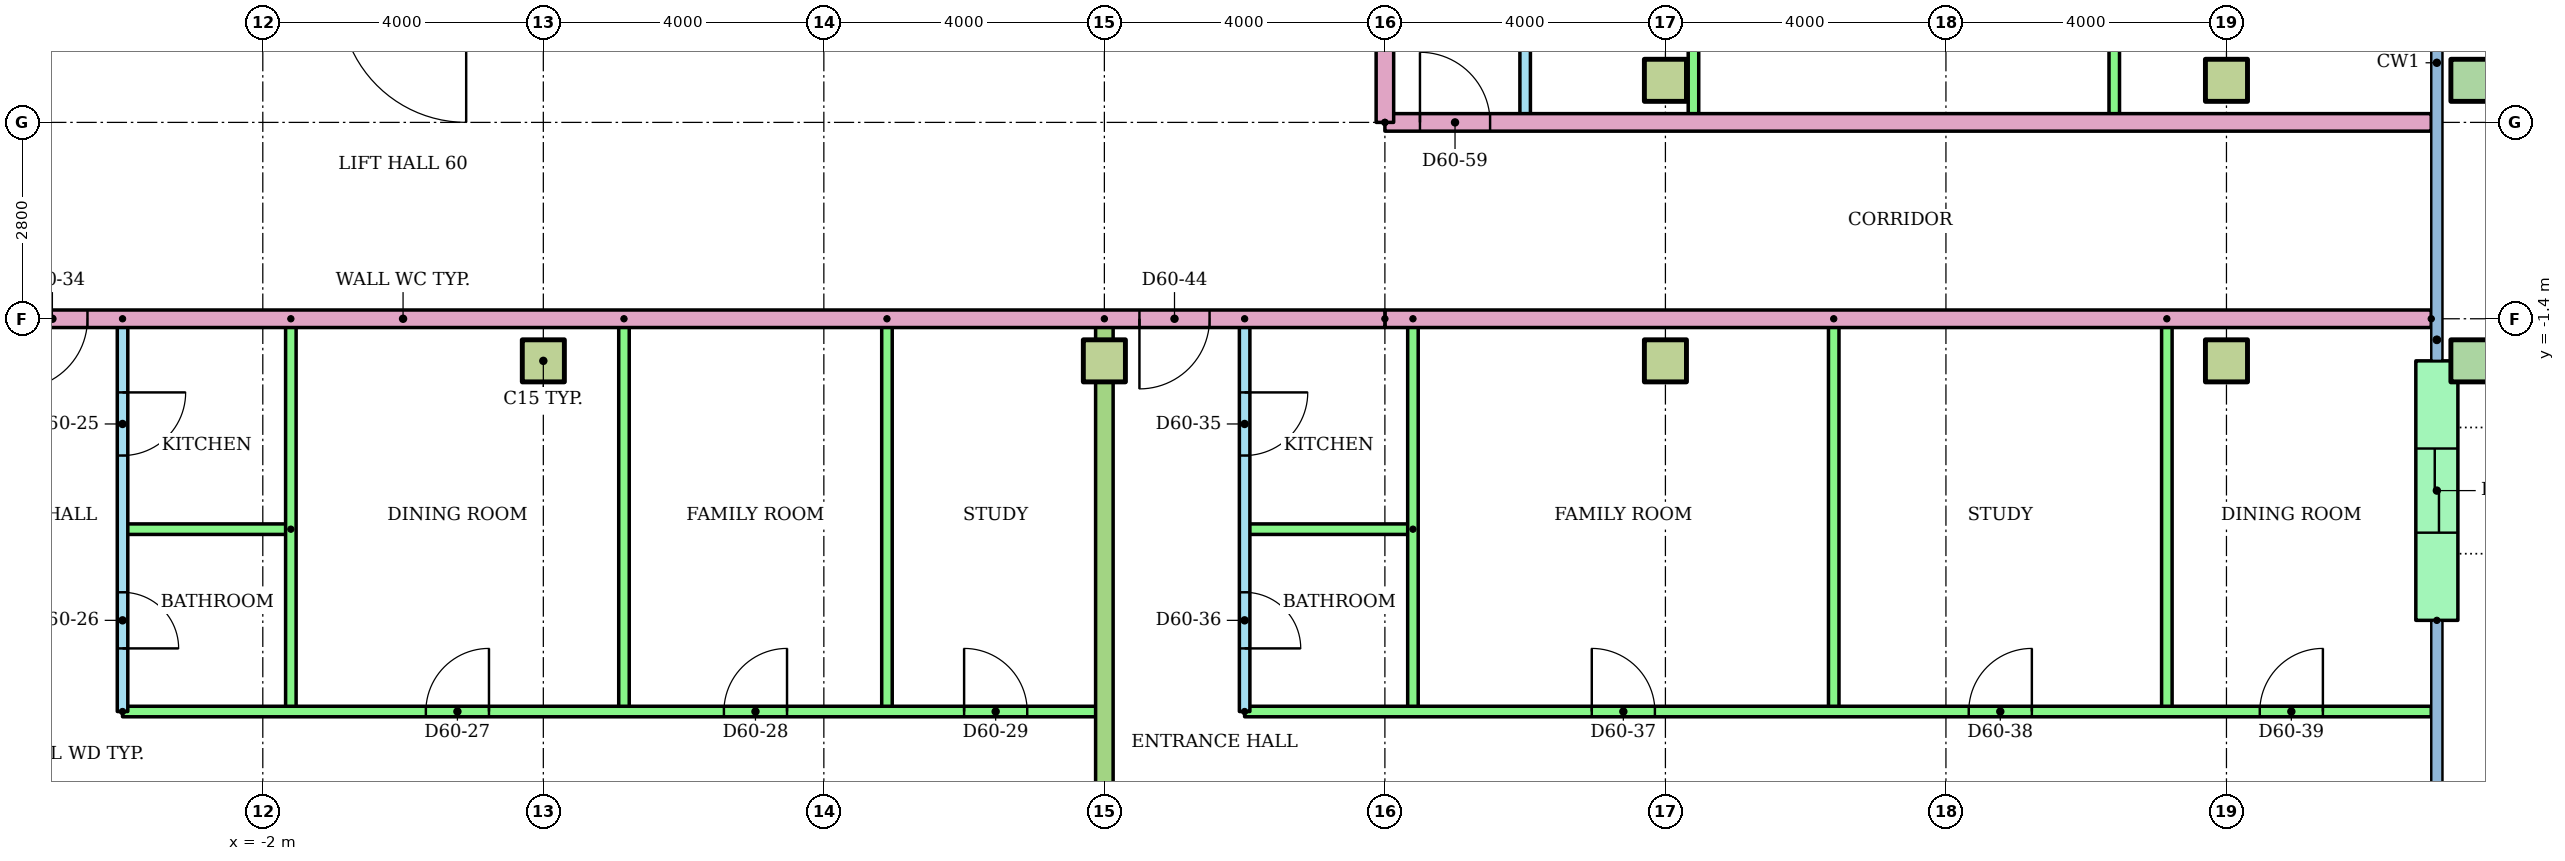
"""IFC4 building model, lengths in metres.
Left out: names, types, materials, properties, quantities, classifications, styles, units other than length and angle.
Written with IfcOpenShell. Run it as: python <this file> out.ifc"""

import sys

from ifc_helpers import new_model, si_unit, direction, frame, frame_2d, origin, origin_2d, place, context, subcontext, project, spatial, rectangle, hollow_rectangle, extrude, element, fill, save


model = new_model("IFC4")
c1 = context("Model", 3, precision=1e-05, world=origin(), true_north=direction((0.0, 1.0)))
c2 = subcontext(c1, "Body", "Model", "MODEL_VIEW")
j1 = project(units=[si_unit("LENGTHUNIT", "METRE"), si_unit("PLANEANGLEUNIT", "RADIAN")], contexts=[c1])
p1 = place(None, origin())
s1 = spatial("IfcSite", under=j1, at=p1, CompositionType="ELEMENT")
p2 = place(p1, origin())
s2 = spatial("IfcBuilding", under=s1, at=p2, CompositionType="ELEMENT")
p3 = place(p2, frame((0.0, 0.0, 230.0)))
s3 = spatial("IfcBuildingStorey", under=s2, at=p3, CompositionType="ELEMENT", Elevation=230.0)
for number, where in (
    (1, (2.0, -2.0, 0.0)),
    (2, (10.0, -2.0, 0.0)),
    (3, (18.0, -2.0, 0.0)),
    (4, (26.0, -2.0, 0.0)),
):
    element("IfcColumn", number, at=place(p3, frame(where)), inside=s3, PredefinedType="COLUMN", context=c2, shape_type="SweptSolid", body=[
        extrude(rectangle(XDim=0.6, YDim=0.6, at=origin_2d()), origin(), (0.0, 0.0, 1.0), 3.2),
    ])
p4 = place(p3, frame((29.5, -2.0, 0.0)))
e5 = element("IfcColumn", 5, at=p4, inside=s3, PredefinedType="COLUMN", context=c2, shape_type="SweptSolid", body=[
    extrude(hollow_rectangle(XDim=0.6, YDim=0.6, WallThickness=0.03, at=origin_2d()), origin(), (0.0, 0.0, 1.0), 3.2),
])
for number, where in (
    (6, (18.0, 2.0, 0.0)),
    (7, (26.0, 2.0, 0.0)),
):
    element("IfcColumn", number, at=place(p3, frame(where)), inside=s3, PredefinedType="COLUMN", context=c2, shape_type="SweptSolid", body=[
        extrude(rectangle(XDim=0.6, YDim=0.6, at=origin_2d()), origin(), (0.0, 0.0, 1.0), 3.2),
    ])
p5 = place(p3, frame((29.5, 2.0, 0.0)))
e8 = element("IfcColumn", 8, at=p5, inside=s3, PredefinedType="COLUMN", context=c2, shape_type="SweptSolid", body=[
    extrude(hollow_rectangle(XDim=0.6, YDim=0.6, WallThickness=0.03, at=origin_2d()), origin(), (0.0, 0.0, 1.0), 3.2),
])
p6 = place(p3, frame((29.0, -5.7, 0.0), z_axis=(0.0, 0.0, 1.0), x_axis=(0.0, 1.0, 0.0)))
e9 = element("IfcWall", 9, at=p6, inside=s3, PredefinedType="STANDARD", context=c2, shape_type="SweptSolid", body=[
    extrude(rectangle(XDim=3.7, YDim=0.6, at=frame_2d((1.85, 0.0))), origin(), (0.0, 0.0, 1.0), 2.92),
])
p7 = place(p6, frame((1.25, 0.0, 0.0)))
e10 = element("IfcOpeningElement", 10, at=p7, cuts=e9, PredefinedType="OPENING", context=c2, shape_type="SweptSolid", body=[
    extrude(rectangle(XDim=1.2, YDim=2.1, at=frame_2d((0.6, 1.05))), frame((0.0, 0.31, 0.0), z_axis=(0.0, -1.0, 0.0), x_axis=(1.0, 0.0, 0.0)), (0.0, 0.0, 1.0), 0.62),
])
p8 = place(p3, frame((-4.0, -1.4, 0.0), z_axis=(0.0, 0.0, 1.0), x_axis=(0.0, -1.0, 0.0)))
e11 = element("IfcWall", 11, at=p8, inside=s3, PredefinedType="PARTITIONING", context=c2, shape_type="SweptSolid", body=[
    extrude(rectangle(XDim=5.6, YDim=0.15, at=frame_2d((2.8, 0.0))), origin(), (0.0, 0.0, 1.0), 2.4),
])
p9 = place(p8, frame((1.05, 0.0, 0.0)))
e12 = element("IfcOpeningElement", 12, at=p9, cuts=e11, PredefinedType="OPENING", context=c2, shape_type="SweptSolid", body=[
    extrude(rectangle(XDim=0.9, YDim=2.1, at=frame_2d((0.45, 1.05))), frame((0.0, 0.085, 0.0), z_axis=(0.0, -1.0, 0.0), x_axis=(1.0, 0.0, 0.0)), (0.0, 0.0, 1.0), 0.17),
])
p10 = place(p8, frame((3.9, 0.0, 0.0)))
e13 = element("IfcOpeningElement", 13, at=p10, cuts=e11, PredefinedType="OPENING", context=c2, shape_type="SweptSolid", body=[
    extrude(rectangle(XDim=0.8, YDim=2.1, at=frame_2d((0.4, 1.05))), frame((0.0, 0.085, 0.0), z_axis=(0.0, -1.0, 0.0), x_axis=(1.0, 0.0, 0.0)), (0.0, 0.0, 1.0), 0.17),
])
p11 = place(p3, frame((-1.6, -4.4, 0.0), z_axis=(0.0, 0.0, 1.0), x_axis=(-1.0, 0.0, 0.0)))
e14 = element("IfcWall", 14, at=p11, inside=s3, PredefinedType="PARTITIONING", context=c2, shape_type="SweptSolid", body=[
    extrude(rectangle(XDim=2.4, YDim=0.15, at=frame_2d((1.2, 0.0))), origin(), (0.0, 0.0, 1.0), 2.4),
])
for number, where, z_axis, x_axis in (
    (15, (-1.6, -1.4, 0.0), (0.0, 0.0, 1.0), (0.0, -1.0, 0.0)),
    (16, (3.15, -1.4, 0.0), (0.0, 0.0, 1.0), (0.0, -1.0, 0.0)),
    (17, (6.9, -1.4, 0.0), (0.0, 0.0, 1.0), (0.0, -1.0, 0.0)),
):
    element("IfcWall", number, at=place(p3, frame(where, z_axis=z_axis, x_axis=x_axis)), inside=s3, PredefinedType="PARTITIONING", context=c2, shape_type="SweptSolid", body=[
        extrude(rectangle(XDim=5.6, YDim=0.15, at=frame_2d((2.8, 0.0))), origin(), (0.0, 0.0, 1.0), 2.4),
    ])
p12 = place(p3, frame((-4.0, -7.0, 0.0)))
e18 = element("IfcWall", 18, at=p12, inside=s3, PredefinedType="PARTITIONING", context=c2, shape_type="SweptSolid", body=[
    extrude(rectangle(XDim=14.0, YDim=0.15, at=frame_2d((7.0, 0.0))), origin(), (0.0, 0.0, 1.0), 2.4),
])
p13 = place(p12, frame((4.325, 0.0, 0.0)))
e19 = element("IfcOpeningElement", 19, at=p13, cuts=e18, PredefinedType="OPENING", context=c2, shape_type="SweptSolid", body=[
    extrude(rectangle(XDim=0.9, YDim=2.1, at=frame_2d((0.45, 1.05))), frame((0.0, 0.085, 0.0), z_axis=(0.0, -1.0, 0.0), x_axis=(1.0, 0.0, 0.0)), (0.0, 0.0, 1.0), 0.17),
])
p14 = place(p12, frame((8.575, 0.0, 0.0)))
e20 = element("IfcOpeningElement", 20, at=p14, cuts=e18, PredefinedType="OPENING", context=c2, shape_type="SweptSolid", body=[
    extrude(rectangle(XDim=0.9, YDim=2.1, at=frame_2d((0.45, 1.05))), frame((0.0, 0.085, 0.0), z_axis=(0.0, -1.0, 0.0), x_axis=(1.0, 0.0, 0.0)), (0.0, 0.0, 1.0), 0.17),
])
p15 = place(p12, frame((12.0, 0.0, 0.0)))
e21 = element("IfcOpeningElement", 21, at=p15, cuts=e18, PredefinedType="OPENING", context=c2, shape_type="SweptSolid", body=[
    extrude(rectangle(XDim=0.9, YDim=2.1, at=frame_2d((0.45, 1.05))), frame((0.0, 0.085, 0.0), z_axis=(0.0, -1.0, 0.0), x_axis=(1.0, 0.0, 0.0)), (0.0, 0.0, 1.0), 0.17),
])
p16 = place(p3, frame((12.0, -1.4, 0.0), z_axis=(0.0, 0.0, 1.0), x_axis=(0.0, -1.0, 0.0)))
e22 = element("IfcWall", 22, at=p16, inside=s3, PredefinedType="PARTITIONING", context=c2, shape_type="SweptSolid", body=[
    extrude(rectangle(XDim=5.6, YDim=0.15, at=frame_2d((2.8, 0.0))), origin(), (0.0, 0.0, 1.0), 2.4),
])
p17 = place(p16, frame((1.05, 0.0, 0.0)))
e23 = element("IfcOpeningElement", 23, at=p17, cuts=e22, PredefinedType="OPENING", context=c2, shape_type="SweptSolid", body=[
    extrude(rectangle(XDim=0.9, YDim=2.1, at=frame_2d((0.45, 1.05))), frame((0.0, 0.085, 0.0), z_axis=(0.0, -1.0, 0.0), x_axis=(1.0, 0.0, 0.0)), (0.0, 0.0, 1.0), 0.17),
])
p18 = place(p16, frame((3.9, 0.0, 0.0)))
e24 = element("IfcOpeningElement", 24, at=p18, cuts=e22, PredefinedType="OPENING", context=c2, shape_type="SweptSolid", body=[
    extrude(rectangle(XDim=0.8, YDim=2.1, at=frame_2d((0.4, 1.05))), frame((0.0, 0.085, 0.0), z_axis=(0.0, -1.0, 0.0), x_axis=(1.0, 0.0, 0.0)), (0.0, 0.0, 1.0), 0.17),
])
p19 = place(p3, frame((14.4, -4.4, 0.0), z_axis=(0.0, 0.0, 1.0), x_axis=(-1.0, 0.0, 0.0)))
e25 = element("IfcWall", 25, at=p19, inside=s3, PredefinedType="PARTITIONING", context=c2, shape_type="SweptSolid", body=[
    extrude(rectangle(XDim=2.4, YDim=0.15, at=frame_2d((1.2, 0.0))), origin(), (0.0, 0.0, 1.0), 2.4),
])
for number, where, z_axis, x_axis in (
    (26, (14.4, -1.4, 0.0), (0.0, 0.0, 1.0), (0.0, -1.0, 0.0)),
    (27, (20.4, -1.4, 0.0), (0.0, 0.0, 1.0), (0.0, -1.0, 0.0)),
    (28, (25.15, -1.4, 0.0), (0.0, 0.0, 1.0), (0.0, -1.0, 0.0)),
):
    element("IfcWall", number, at=place(p3, frame(where, z_axis=z_axis, x_axis=x_axis)), inside=s3, PredefinedType="PARTITIONING", context=c2, shape_type="SweptSolid", body=[
        extrude(rectangle(XDim=5.6, YDim=0.15, at=frame_2d((2.8, 0.0))), origin(), (0.0, 0.0, 1.0), 2.4),
    ])
p20 = place(p3, frame((12.0, -7.0, 0.0)))
e29 = element("IfcWall", 29, at=p20, inside=s3, PredefinedType="PARTITIONING", context=c2, shape_type="SweptSolid", body=[
    extrude(rectangle(XDim=16.92, YDim=0.15, at=frame_2d((8.46, 0.0))), origin(), (0.0, 0.0, 1.0), 2.4),
])
p21 = place(p20, frame((4.95, 0.0, 0.0)))
e30 = element("IfcOpeningElement", 30, at=p21, cuts=e29, PredefinedType="OPENING", context=c2, shape_type="SweptSolid", body=[
    extrude(rectangle(XDim=0.9, YDim=2.1, at=frame_2d((0.45, 1.05))), frame((0.0, 0.085, 0.0), z_axis=(0.0, -1.0, 0.0), x_axis=(1.0, 0.0, 0.0)), (0.0, 0.0, 1.0), 0.17),
])
p22 = place(p20, frame((10.325, 0.0, 0.0)))
e31 = element("IfcOpeningElement", 31, at=p22, cuts=e29, PredefinedType="OPENING", context=c2, shape_type="SweptSolid", body=[
    extrude(rectangle(XDim=0.9, YDim=2.1, at=frame_2d((0.45, 1.05))), frame((0.0, 0.085, 0.0), z_axis=(0.0, -1.0, 0.0), x_axis=(1.0, 0.0, 0.0)), (0.0, 0.0, 1.0), 0.17),
])
p23 = place(p20, frame((14.475, 0.0, 0.0)))
e32 = element("IfcOpeningElement", 32, at=p23, cuts=e29, PredefinedType="OPENING", context=c2, shape_type="SweptSolid", body=[
    extrude(rectangle(XDim=0.9, YDim=2.1, at=frame_2d((0.45, 1.05))), frame((0.0, 0.085, 0.0), z_axis=(0.0, -1.0, 0.0), x_axis=(1.0, 0.0, 0.0)), (0.0, 0.0, 1.0), 0.17),
])
p24 = place(p3, frame((10.0, -1.4, 0.0), z_axis=(0.0, 0.0, 1.0), x_axis=(0.0, -1.0, 0.0)))
e33 = element("IfcWall", 33, at=p24, inside=s3, PredefinedType="PARTITIONING", context=c2, shape_type="SweptSolid", body=[
    extrude(rectangle(XDim=15.11, YDim=0.25, at=frame_2d((7.555, 0.0))), origin(), (0.0, 0.0, 1.0), 2.4),
])
p25 = place(p3, frame((28.92, -1.4, 0.0), z_axis=(0.0, 0.0, 1.0), x_axis=(-1.0, 0.0, 0.0)))
e34 = element("IfcWall", 34, at=p25, inside=s3, PredefinedType="PARTITIONING", context=c2, shape_type="SweptSolid", body=[
    extrude(rectangle(XDim=14.92, YDim=0.25, at=frame_2d((7.46, 0.0))), origin(), (0.0, 0.0, 1.0), 2.4),
])
p26 = place(p3, frame((16.0, 9.4, 0.0), z_axis=(0.0, 0.0, 1.0), x_axis=(0.0, -1.0, 0.0)))
e35 = element("IfcWall", 35, at=p26, inside=s3, PredefinedType="PARTITIONING", context=c2, shape_type="SweptSolid", body=[
    extrude(rectangle(XDim=8.0, YDim=0.15, at=frame_2d((4.0, 0.0))), origin(), (0.0, 0.0, 1.0), 2.4),
])
p27 = place(p26, frame((5.3, 0.0, 0.0)))
e36 = element("IfcOpeningElement", 36, at=p27, cuts=e35, PredefinedType="OPENING", context=c2, shape_type="SweptSolid", body=[
    extrude(rectangle(XDim=0.9, YDim=2.1, at=frame_2d((0.45, 1.05))), frame((0.0, 0.085, 0.0), z_axis=(0.0, -1.0, 0.0), x_axis=(1.0, 0.0, 0.0)), (0.0, 0.0, 1.0), 0.17),
])
p28 = place(p26, frame((1.35, 0.0, 0.0)))
e37 = element("IfcOpeningElement", 37, at=p28, cuts=e35, PredefinedType="OPENING", context=c2, shape_type="SweptSolid", body=[
    extrude(rectangle(XDim=0.8, YDim=2.1, at=frame_2d((0.4, 1.05))), frame((0.0, 0.085, 0.0), z_axis=(0.0, -1.0, 0.0), x_axis=(1.0, 0.0, 0.0)), (0.0, 0.0, 1.0), 0.17),
])
for number, where, z_axis, x_axis in (
    (38, (18.4, 9.4, 0.0), (0.0, 0.0, 1.0), (0.0, -1.0, 0.0)),
    (39, (24.4, 9.4, 0.0), (0.0, 0.0, 1.0), (0.0, -1.0, 0.0)),
):
    element("IfcWall", number, at=place(p3, frame(where, z_axis=z_axis, x_axis=x_axis)), inside=s3, PredefinedType="PARTITIONING", context=c2, shape_type="SweptSolid", body=[
        extrude(rectangle(XDim=8.0, YDim=0.15, at=frame_2d((4.0, 0.0))), origin(), (0.0, 0.0, 1.0), 2.4),
    ])
p29 = place(p3, frame((14.0, 1.4, 0.0)))
e40 = element("IfcWall", 40, at=p29, inside=s3, PredefinedType="PARTITIONING", context=c2, shape_type="SweptSolid", body=[
    extrude(rectangle(XDim=14.92, YDim=0.25, at=frame_2d((7.46, 0.0))), origin(), (0.0, 0.0, 1.0), 2.4),
])
p30 = place(p29, frame((0.5, 0.0, 0.0)))
e41 = element("IfcOpeningElement", 41, at=p30, cuts=e40, PredefinedType="OPENING", context=c2, shape_type="SweptSolid", body=[
    extrude(rectangle(XDim=1.0, YDim=2.1, at=frame_2d((0.5, 1.05))), frame((0.0, 0.135, 0.0), z_axis=(0.0, -1.0, 0.0), x_axis=(1.0, 0.0, 0.0)), (0.0, 0.0, 1.0), 0.27),
])
p31 = place(p3, frame((14.0, -1.4, 0.0), z_axis=(0.0, 0.0, 1.0), x_axis=(-1.0, 0.0, 0.0)))
e42 = element("IfcWall", 42, at=p31, inside=s3, PredefinedType="PARTITIONING", context=c2, shape_type="SweptSolid", body=[
    extrude(rectangle(XDim=28.0, YDim=0.25, at=frame_2d((14.0, 0.0))), origin(), (0.0, 0.0, 1.0), 2.4),
])
p32 = place(p31, frame((20.5, 0.0, 0.0)))
e43 = element("IfcOpeningElement", 43, at=p32, cuts=e42, PredefinedType="OPENING", context=c2, shape_type="SweptSolid", body=[
    extrude(rectangle(XDim=1.0, YDim=2.1, at=frame_2d((0.5, 1.05))), frame((0.0, 0.135, 0.0), z_axis=(0.0, -1.0, 0.0), x_axis=(1.0, 0.0, 0.0)), (0.0, 0.0, 1.0), 0.27),
])
p33 = place(p31, frame((18.5, 0.0, 0.0)))
e44 = element("IfcOpeningElement", 44, at=p33, cuts=e42, PredefinedType="OPENING", context=c2, shape_type="SweptSolid", body=[
    extrude(rectangle(XDim=1.0, YDim=2.1, at=frame_2d((0.5, 1.05))), frame((0.0, 0.135, 0.0), z_axis=(0.0, -1.0, 0.0), x_axis=(1.0, 0.0, 0.0)), (0.0, 0.0, 1.0), 0.27),
])
p34 = place(p31, frame((2.5, 0.0, 0.0)))
e45 = element("IfcOpeningElement", 45, at=p34, cuts=e42, PredefinedType="OPENING", context=c2, shape_type="SweptSolid", body=[
    extrude(rectangle(XDim=1.0, YDim=2.1, at=frame_2d((0.5, 1.05))), frame((0.0, 0.135, 0.0), z_axis=(0.0, -1.0, 0.0), x_axis=(1.0, 0.0, 0.0)), (0.0, 0.0, 1.0), 0.27),
])
p35 = place(p3, frame((14.0, 1.4, 0.0), z_axis=(0.0, 0.0, 1.0), x_axis=(0.0, 1.0, 0.0)))
e46 = element("IfcWall", 46, at=p35, inside=s3, PredefinedType="PARTITIONING", context=c2, shape_type="SweptSolid", body=[
    extrude(rectangle(XDim=1.6, YDim=0.25, at=frame_2d((0.8, 0.0))), origin(), (0.0, 0.0, 1.0), 2.4),
])
p36 = place(p9, origin())
e47 = element("IfcDoor", 47, at=p36, inside=s3, OperationType="SINGLE_SWING_LEFT", PredefinedType="DOOR", context=c2, shape_type="SweptSolid", body=[
    extrude(rectangle(XDim=0.9, YDim=2.1, at=frame_2d((0.45, 1.05))), frame((0.0, 0.025, 0.0), z_axis=(0.0, -1.0, 0.0), x_axis=(1.0, 0.0, 0.0)), (0.0, 0.0, 1.0), 0.05),
])
fill(e12, e47)
p37 = place(p10, origin())
e48 = element("IfcDoor", 48, at=p37, inside=s3, OperationType="SINGLE_SWING_RIGHT", PredefinedType="DOOR", context=c2, shape_type="SweptSolid", body=[
    extrude(rectangle(XDim=0.8, YDim=2.1, at=frame_2d((0.4, 1.05))), frame((0.0, 0.025, 0.0), z_axis=(0.0, -1.0, 0.0), x_axis=(1.0, 0.0, 0.0)), (0.0, 0.0, 1.0), 0.05),
])
fill(e13, e48)
p38 = place(p13, origin())
e49 = element("IfcDoor", 49, at=p38, inside=s3, OperationType="SINGLE_SWING_RIGHT", PredefinedType="DOOR", context=c2, shape_type="SweptSolid", body=[
    extrude(rectangle(XDim=0.9, YDim=2.1, at=frame_2d((0.45, 1.05))), frame((0.0, 0.025, 0.0), z_axis=(0.0, -1.0, 0.0), x_axis=(1.0, 0.0, 0.0)), (0.0, 0.0, 1.0), 0.05),
])
fill(e19, e49)
p39 = place(p14, origin())
e50 = element("IfcDoor", 50, at=p39, inside=s3, OperationType="SINGLE_SWING_RIGHT", PredefinedType="DOOR", context=c2, shape_type="SweptSolid", body=[
    extrude(rectangle(XDim=0.9, YDim=2.1, at=frame_2d((0.45, 1.05))), frame((0.0, 0.025, 0.0), z_axis=(0.0, -1.0, 0.0), x_axis=(1.0, 0.0, 0.0)), (0.0, 0.0, 1.0), 0.05),
])
fill(e20, e50)
p40 = place(p15, origin())
e51 = element("IfcDoor", 51, at=p40, inside=s3, OperationType="SINGLE_SWING_LEFT", PredefinedType="DOOR", context=c2, shape_type="SweptSolid", body=[
    extrude(rectangle(XDim=0.9, YDim=2.1, at=frame_2d((0.45, 1.05))), frame((0.0, 0.025, 0.0), z_axis=(0.0, -1.0, 0.0), x_axis=(1.0, 0.0, 0.0)), (0.0, 0.0, 1.0), 0.05),
])
fill(e21, e51)
p41 = place(p33, origin())
e52 = element("IfcDoor", 52, at=p41, inside=s3, OperationType="SINGLE_SWING_RIGHT", PredefinedType="DOOR", context=c2, shape_type="SweptSolid", body=[
    extrude(rectangle(XDim=1.0, YDim=2.1, at=frame_2d((0.5, 1.05))), frame((0.0, 0.025, 0.0), z_axis=(0.0, -1.0, 0.0), x_axis=(1.0, 0.0, 0.0)), (0.0, 0.0, 1.0), 0.05),
])
fill(e44, e52)
p42 = place(p17, origin())
e53 = element("IfcDoor", 53, at=p42, inside=s3, OperationType="SINGLE_SWING_LEFT", PredefinedType="DOOR", context=c2, shape_type="SweptSolid", body=[
    extrude(rectangle(XDim=0.9, YDim=2.1, at=frame_2d((0.45, 1.05))), frame((0.0, 0.025, 0.0), z_axis=(0.0, -1.0, 0.0), x_axis=(1.0, 0.0, 0.0)), (0.0, 0.0, 1.0), 0.05),
])
fill(e23, e53)
p43 = place(p18, origin())
e54 = element("IfcDoor", 54, at=p43, inside=s3, OperationType="SINGLE_SWING_RIGHT", PredefinedType="DOOR", context=c2, shape_type="SweptSolid", body=[
    extrude(rectangle(XDim=0.8, YDim=2.1, at=frame_2d((0.4, 1.05))), frame((0.0, 0.025, 0.0), z_axis=(0.0, -1.0, 0.0), x_axis=(1.0, 0.0, 0.0)), (0.0, 0.0, 1.0), 0.05),
])
fill(e24, e54)
p44 = place(p21, origin())
e55 = element("IfcDoor", 55, at=p44, inside=s3, OperationType="SINGLE_SWING_LEFT", PredefinedType="DOOR", context=c2, shape_type="SweptSolid", body=[
    extrude(rectangle(XDim=0.9, YDim=2.1, at=frame_2d((0.45, 1.05))), frame((0.0, 0.025, 0.0), z_axis=(0.0, -1.0, 0.0), x_axis=(1.0, 0.0, 0.0)), (0.0, 0.0, 1.0), 0.05),
])
fill(e30, e55)
p45 = place(p22, origin())
e56 = element("IfcDoor", 56, at=p45, inside=s3, OperationType="SINGLE_SWING_RIGHT", PredefinedType="DOOR", context=c2, shape_type="SweptSolid", body=[
    extrude(rectangle(XDim=0.9, YDim=2.1, at=frame_2d((0.45, 1.05))), frame((0.0, 0.025, 0.0), z_axis=(0.0, -1.0, 0.0), x_axis=(1.0, 0.0, 0.0)), (0.0, 0.0, 1.0), 0.05),
])
fill(e31, e56)
p46 = place(p23, origin())
e57 = element("IfcDoor", 57, at=p46, inside=s3, OperationType="SINGLE_SWING_RIGHT", PredefinedType="DOOR", context=c2, shape_type="SweptSolid", body=[
    extrude(rectangle(XDim=0.9, YDim=2.1, at=frame_2d((0.45, 1.05))), frame((0.0, 0.025, 0.0), z_axis=(0.0, -1.0, 0.0), x_axis=(1.0, 0.0, 0.0)), (0.0, 0.0, 1.0), 0.05),
])
fill(e32, e57)
p47 = place(p34, origin())
e58 = element("IfcDoor", 58, at=p47, inside=s3, OperationType="SINGLE_SWING_RIGHT", PredefinedType="DOOR", context=c2, shape_type="SweptSolid", body=[
    extrude(rectangle(XDim=1.0, YDim=2.1, at=frame_2d((0.5, 1.05))), frame((0.0, 0.025, 0.0), z_axis=(0.0, -1.0, 0.0), x_axis=(1.0, 0.0, 0.0)), (0.0, 0.0, 1.0), 0.05),
])
fill(e45, e58)
p48 = place(p30, origin())
e59 = element("IfcDoor", 59, at=p48, inside=s3, OperationType="SINGLE_SWING_LEFT", PredefinedType="DOOR", context=c2, shape_type="SweptSolid", body=[
    extrude(rectangle(XDim=1.0, YDim=2.1, at=frame_2d((0.5, 1.05))), frame((0.0, 0.025, 0.0), z_axis=(0.0, -1.0, 0.0), x_axis=(1.0, 0.0, 0.0)), (0.0, 0.0, 1.0), 0.05),
])
fill(e41, e59)
p49 = place(p7, origin())
e60 = element("IfcDoor", 60, at=p49, inside=s3, OperationType="SLIDING_TO_LEFT", PredefinedType="DOOR", context=c2, shape_type="SweptSolid", body=[
    extrude(rectangle(XDim=1.2, YDim=2.1, at=frame_2d((0.6, 1.05))), frame((0.0, 0.025, 0.0), z_axis=(0.0, -1.0, 0.0), x_axis=(1.0, 0.0, 0.0)), (0.0, 0.0, 1.0), 0.05),
])
fill(e10, e60)
save(model, sys.argv[1])
